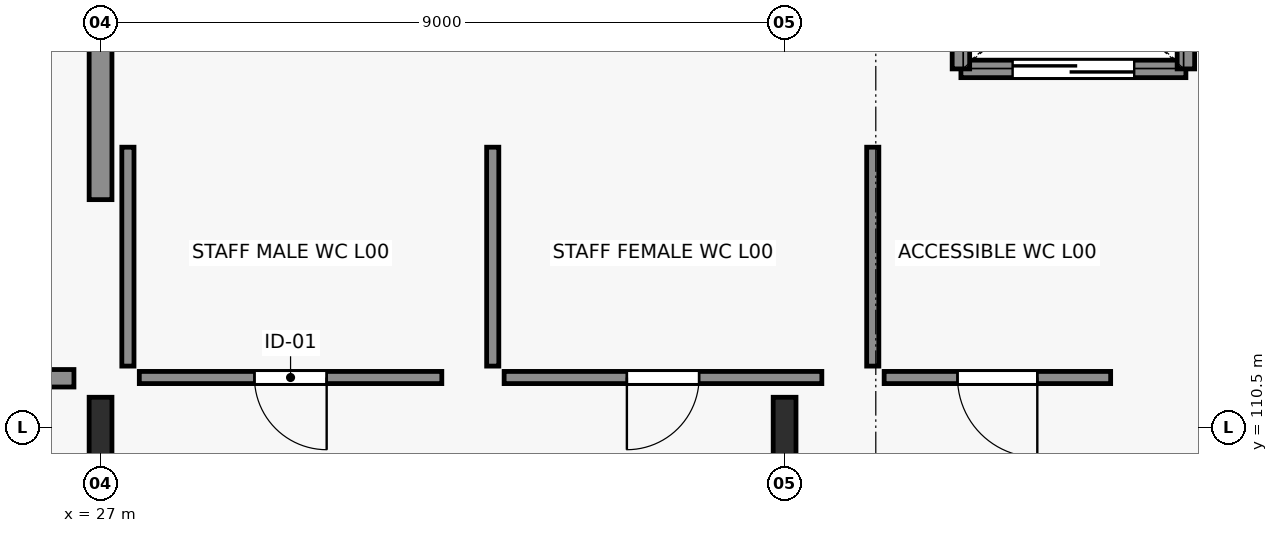
"""IFC4 building model, lengths in metres.
Left out: names, types, materials, properties, quantities, classifications, styles, units other than length and angle.
Written with IfcOpenShell. Run it as: python <this file> out.ifc"""

import sys

from ifc_helpers import new_model, si_unit, direction, frame, frame_2d, origin, origin_2d, place, context, subcontext, project, spatial, rectangle, i_section, extrude, element, fill, save


model = new_model("IFC4")
c1 = context("Model", 3, precision=1e-05, world=origin(), true_north=direction((0.0, 1.0)))
c2 = subcontext(c1, "Body", "Model", "MODEL_VIEW")
j1 = project(units=[si_unit("LENGTHUNIT", "METRE"), si_unit("PLANEANGLEUNIT", "RADIAN")], contexts=[c1])
p1 = place(None, origin())
s1 = spatial("IfcSite", under=j1, at=p1, CompositionType="ELEMENT")
p2 = place(p1, origin())
s2 = spatial("IfcBuilding", under=s1, at=p2, CompositionType="ELEMENT")
p3 = place(p2, origin())
s3 = spatial("IfcBuildingStorey", under=s2, at=p3, CompositionType="ELEMENT", Elevation=0.0)
for number, where, z_axis, x_axis in (
    (1, (27.0, 110.5, 0.0), (0.0, 0.0, 1.0), (1.0, 0.0, 0.0)),
    (2, (36.0, 110.5, 0.0), (0.0, 0.0, 1.0), (1.0, 0.0, 0.0)),
):
    element("IfcColumn", number, at=place(p3, frame(where, z_axis=z_axis, x_axis=x_axis)), inside=s3, PredefinedType="COLUMN", context=c2, shape_type="SweptSolid", body=[
        extrude(i_section(OverallWidth=0.3, OverallDepth=0.8, WebThickness=0.018, FlangeThickness=0.033, FilletRadius=0.03, at=origin_2d()), origin(), (0.0, 0.0, 1.0), 4.61),
    ])
p4 = place(p3, frame((27.0, 113.5, 0.0), z_axis=(0.0, 0.0, 1.0), x_axis=(0.0, 1.0, 0.0)))
e3 = element("IfcWall", 3, at=p4, inside=s3, PredefinedType="SHEAR", context=c2, shape_type="SweptSolid", body=[
    extrude(rectangle(XDim=4.825, YDim=0.3, at=frame_2d((2.413, 0.0))), origin(), (0.0, 0.0, 1.0), 4.61),
])
p5 = place(p3, frame((31.49, 111.16, 0.0), z_axis=(0.0, 0.0, 1.0), x_axis=(-1.0, 0.0, 0.0)))
e4 = element("IfcWall", 4, at=p5, inside=s3, PredefinedType="PARTITIONING", context=c2, shape_type="SweptSolid", body=[
    extrude(rectangle(XDim=3.98, YDim=0.16, at=frame_2d((1.99, 0.0))), origin(), (0.0, 0.0, 1.0), 4.31),
])
p6 = place(p5, frame((1.515, 0.0, 0.0)))
e5 = element("IfcOpeningElement", 5, at=p6, cuts=e4, PredefinedType="OPENING", context=c2, shape_type="SweptSolid", body=[
    extrude(rectangle(XDim=0.95, YDim=2.15, at=frame_2d((0.475, 1.075))), frame((0.0, 0.09, 0.0), z_axis=(0.0, -1.0, 0.0), x_axis=(1.0, 0.0, 0.0)), (0.0, 0.0, 1.0), 0.18),
])
p7 = place(p3, frame((27.36, 111.31, 0.0), z_axis=(0.0, 0.0, 1.0), x_axis=(0.0, 1.0, 0.0)))
e6 = element("IfcWall", 6, at=p7, inside=s3, PredefinedType="PARTITIONING", context=c2, shape_type="SweptSolid", body=[
    extrude(rectangle(XDim=2.88, YDim=0.16, at=frame_2d((1.44, 0.0))), origin(), (0.0, 0.0, 1.0), 4.55),
])
p8 = place(p3, frame((36.49, 111.16, 0.0), z_axis=(0.0, 0.0, 1.0), x_axis=(-1.0, 0.0, 0.0)))
e7 = element("IfcWall", 7, at=p8, inside=s3, PredefinedType="PARTITIONING", context=c2, shape_type="SweptSolid", body=[
    extrude(rectangle(XDim=4.18, YDim=0.16, at=frame_2d((2.09, 0.0))), origin(), (0.0, 0.0, 1.0), 4.03),
])
p9 = place(p8, frame((1.615, 0.0, 0.0)))
e8 = element("IfcOpeningElement", 8, at=p9, cuts=e7, PredefinedType="OPENING", context=c2, shape_type="SweptSolid", body=[
    extrude(rectangle(XDim=0.95, YDim=2.15, at=frame_2d((0.475, 1.075))), frame((0.0, 0.09, 0.0), z_axis=(0.0, -1.0, 0.0), x_axis=(1.0, 0.0, 0.0)), (0.0, 0.0, 1.0), 0.18),
])
p10 = place(p3, frame((32.16, 111.31, 0.0), z_axis=(0.0, 0.0, 1.0), x_axis=(0.0, 1.0, 0.0)))
e9 = element("IfcWall", 9, at=p10, inside=s3, PredefinedType="PARTITIONING", context=c2, shape_type="SweptSolid", body=[
    extrude(rectangle(XDim=2.88, YDim=0.16, at=frame_2d((1.44, 0.0))), origin(), (0.0, 0.0, 1.0), 4.55),
])
p11 = place(p3, frame((40.29, 111.16, 0.0), z_axis=(0.0, 0.0, 1.0), x_axis=(-1.0, 0.0, 0.0)))
e10 = element("IfcWall", 10, at=p11, inside=s3, PredefinedType="PARTITIONING", context=c2, shape_type="SweptSolid", body=[
    extrude(rectangle(XDim=2.98, YDim=0.16, at=frame_2d((1.49, 0.0))), origin(), (0.0, 0.0, 1.0), 4.31),
])
p12 = place(p11, frame((0.965, 0.0, 0.0)))
e11 = element("IfcOpeningElement", 11, at=p12, cuts=e10, PredefinedType="OPENING", context=c2, shape_type="SweptSolid", body=[
    extrude(rectangle(XDim=1.05, YDim=2.2, at=frame_2d((0.525, 1.1))), frame((0.0, 0.09, 0.0), z_axis=(0.0, -1.0, 0.0), x_axis=(1.0, 0.0, 0.0)), (0.0, 0.0, 1.0), 0.18),
])
p13 = place(p3, frame((37.16, 111.31, 0.0), z_axis=(0.0, 0.0, 1.0), x_axis=(0.0, 1.0, 0.0)))
e12 = element("IfcWall", 12, at=p13, inside=s3, PredefinedType="PARTITIONING", context=c2, shape_type="SweptSolid", body=[
    extrude(rectangle(XDim=2.88, YDim=0.16, at=frame_2d((1.44, 0.0))), origin(), (0.0, 0.0, 1.0), 4.55),
])
p14 = place(p3, frame((41.28, 115.22, 0.0), z_axis=(0.0, 0.0, 1.0), x_axis=(-1.0, 0.0, 0.0)))
e13 = element("IfcWall", 13, at=p14, inside=s3, PredefinedType="SOLIDWALL", context=c2, shape_type="SweptSolid", body=[
    extrude(rectangle(XDim=2.96, YDim=0.23, at=frame_2d((1.48, 0.0))), origin(), (0.0, 0.0, 1.0), 4.31),
])
p15 = place(p14, frame((0.68, 0.0, 0.0)))
e14 = element("IfcOpeningElement", 14, at=p15, cuts=e13, PredefinedType="OPENING", context=c2, shape_type="SweptSolid", body=[
    extrude(rectangle(XDim=1.6, YDim=2.3, at=frame_2d((0.8, 1.15))), frame((0.0, 0.125, 0.0), z_axis=(0.0, -1.0, 0.0), x_axis=(1.0, 0.0, 0.0)), (0.0, 0.0, 1.0), 0.25),
])
for number, where, z_axis, x_axis in (
    (15, (38.32, 115.22, 0.0), (0.0, 0.0, 1.0), (0.0, 1.0, 0.0)),
    (16, (41.28, 117.78, 0.0), (0.0, 0.0, 1.0), (0.0, -1.0, 0.0)),
):
    element("IfcWall", number, at=place(p3, frame(where, z_axis=z_axis, x_axis=x_axis)), inside=s3, PredefinedType="SOLIDWALL", context=c2, shape_type="SweptSolid", body=[
        extrude(rectangle(XDim=2.56, YDim=0.23, at=frame_2d((1.28, 0.0))), origin(), (0.0, 0.0, 1.0), 4.56),
    ])
p16 = place(p3, frame((15.3, 111.15, 0.0), z_axis=(0.0, 0.0, 1.0), x_axis=(1.0, 0.0, 0.0)))
e17 = element("IfcWall", 17, at=p16, inside=s3, PredefinedType="SOLIDWALL", context=c2, shape_type="SweptSolid", body=[
    extrude(rectangle(XDim=11.35, YDim=0.23, at=frame_2d((5.675, 0.0))), origin(), (0.0, 0.0, 1.0), 4.03),
])
p17 = place(p16, frame((0.55, 0.0, 0.0)))
e18 = element("IfcOpeningElement", 18, at=p17, cuts=e17, PredefinedType="OPENING", context=c2, shape_type="SweptSolid", body=[
    extrude(rectangle(XDim=1.8, YDim=2.3, at=frame_2d((0.9, 1.15))), frame((0.0, 0.125, 0.0), z_axis=(0.0, -1.0, 0.0), x_axis=(1.0, 0.0, 0.0)), (0.0, 0.0, 1.0), 0.25),
])
p18 = place(p6, origin())
e19 = element("IfcDoor", 19, at=p18, inside=s3, OperationType="SINGLE_SWING_LEFT", PredefinedType="DOOR", context=c2, shape_type="SweptSolid", body=[
    extrude(rectangle(XDim=0.95, YDim=2.15, at=frame_2d((0.475, 1.075))), frame((0.0, 0.025, 0.0), z_axis=(0.0, -1.0, 0.0), x_axis=(1.0, 0.0, 0.0)), (0.0, 0.0, 1.0), 0.05),
])
fill(e5, e19)
p19 = place(p9, origin())
e20 = element("IfcDoor", 20, at=p19, inside=s3, OperationType="SINGLE_SWING_RIGHT", PredefinedType="DOOR", context=c2, shape_type="SweptSolid", body=[
    extrude(rectangle(XDim=0.95, YDim=2.15, at=frame_2d((0.475, 1.075))), frame((0.0, 0.025, 0.0), z_axis=(0.0, -1.0, 0.0), x_axis=(1.0, 0.0, 0.0)), (0.0, 0.0, 1.0), 0.05),
])
fill(e8, e20)
p20 = place(p12, origin())
e21 = element("IfcDoor", 21, at=p20, inside=s3, OperationType="SINGLE_SWING_LEFT", PredefinedType="DOOR", context=c2, shape_type="SweptSolid", body=[
    extrude(rectangle(XDim=1.05, YDim=2.2, at=frame_2d((0.525, 1.1))), frame((0.0, 0.025, 0.0), z_axis=(0.0, -1.0, 0.0), x_axis=(1.0, 0.0, 0.0)), (0.0, 0.0, 1.0), 0.05),
])
fill(e11, e21)
p21 = place(p15, origin())
e22 = element("IfcDoor", 22, at=p21, inside=s3, OperationType="DOUBLE_DOOR_SLIDING", PredefinedType="DOOR", context=c2, shape_type="SweptSolid", body=[
    extrude(rectangle(XDim=1.6, YDim=2.3, at=frame_2d((0.8, 1.15))), frame((0.0, 0.025, 0.0), z_axis=(0.0, -1.0, 0.0), x_axis=(1.0, 0.0, 0.0)), (0.0, 0.0, 1.0), 0.05),
])
fill(e14, e22)
save(model, sys.argv[1])
